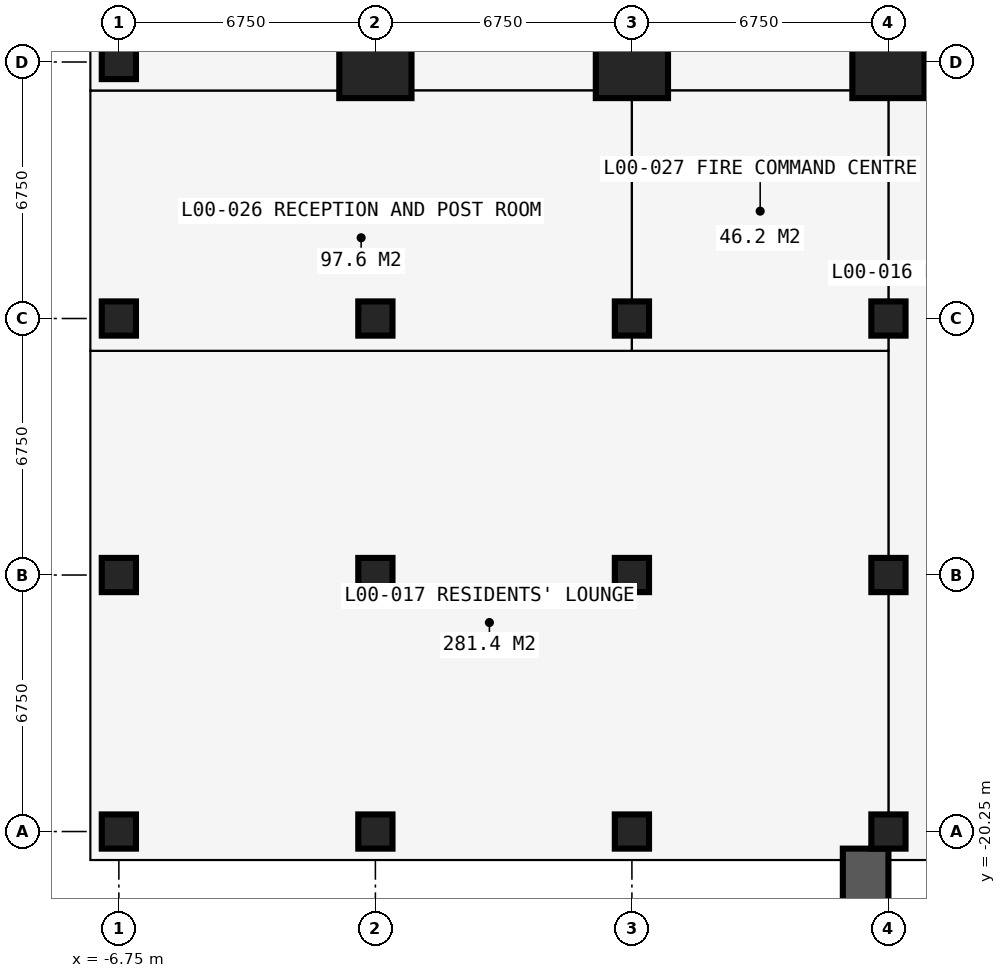
"""IFC4 building model, lengths in metres.
Left out: names, types, materials, properties, quantities, classifications, styles, units other than length and angle.
Written with IfcOpenShell. Run it as: python <this file> out.ifc"""

import sys

from ifc_helpers import new_model, si_unit, direction, frame, frame_2d, origin, origin_with_axes, origin_2d, place, context, subcontext, project, spatial, rectangle, circle, extrude, element, fill, save


model = new_model("IFC4")
c1 = context("Model", 3, precision=1e-05, world=origin(), true_north=direction((0.0, 1.0)))
c2 = subcontext(c1, "Body", "Model", "MODEL_VIEW")
j1 = project(units=[si_unit("LENGTHUNIT", "METRE"), si_unit("PLANEANGLEUNIT", "RADIAN")], contexts=[c1])
p1 = place(None, origin())
s1 = spatial("IfcSite", under=j1, at=p1, CompositionType="ELEMENT")
p2 = place(p1, origin())
s2 = spatial("IfcBuilding", under=s1, at=p2, CompositionType="ELEMENT")
p3 = place(p2, origin())
s3 = spatial("IfcBuildingStorey", under=s2, at=p3, CompositionType="ELEMENT", Elevation=0.0)
for number, where, z_axis, x_axis in (
    (1, (-6.75, -20.25, 0.0), (0.0, 0.0, 1.0), (1.0, 0.0, 0.0)),
    (2, (-6.75, -13.5, 0.0), (0.0, 0.0, 1.0), (1.0, 0.0, 0.0)),
    (3, (-6.75, -6.75, 0.0), (0.0, 0.0, 1.0), (1.0, 0.0, 0.0)),
    (4, (-6.75, 0.0, 0.0), (0.0, 0.0, 1.0), (1.0, 0.0, 0.0)),
    (5, (0.0, -20.25, 0.0), (0.0, 0.0, 1.0), (1.0, 0.0, 0.0)),
    (6, (0.0, -13.5, 0.0), (0.0, 0.0, 1.0), (1.0, 0.0, 0.0)),
    (7, (0.0, -6.75, 0.0), (0.0, 0.0, 1.0), (1.0, 0.0, 0.0)),
):
    element("IfcColumn", number, at=place(p3, frame(where, z_axis=z_axis, x_axis=x_axis)), inside=s3, PredefinedType="COLUMN", context=c2, shape_type="SweptSolid", body=[
        extrude(circle(Radius=0.45, at=origin_2d()), origin(), (0.0, 0.0, 1.0), 4.5),
    ])
p4 = place(p3, origin_with_axes())
e8 = element("IfcColumn", 8, at=p4, inside=s3, PredefinedType="COLUMN", context=c2, shape_type="SweptSolid", body=[
    extrude(rectangle(XDim=1.9, YDim=1.9, at=origin_2d()), origin(), (0.0, 0.0, 1.0), 4.5),
])
for number, where, z_axis, x_axis in (
    (9, (6.75, -20.25, 0.0), (0.0, 0.0, 1.0), (1.0, 0.0, 0.0)),
    (10, (6.75, -13.5, 0.0), (0.0, 0.0, 1.0), (1.0, 0.0, 0.0)),
    (11, (6.75, -6.75, 0.0), (0.0, 0.0, 1.0), (1.0, 0.0, 0.0)),
):
    element("IfcColumn", number, at=place(p3, frame(where, z_axis=z_axis, x_axis=x_axis)), inside=s3, PredefinedType="COLUMN", context=c2, shape_type="SweptSolid", body=[
        extrude(circle(Radius=0.45, at=origin_2d()), origin(), (0.0, 0.0, 1.0), 4.5),
    ])
p5 = place(p3, frame((6.75, 0.0, 0.0), z_axis=(0.0, 0.0, 1.0), x_axis=(1.0, 0.0, 0.0)))
e12 = element("IfcColumn", 12, at=p5, inside=s3, PredefinedType="COLUMN", context=c2, shape_type="SweptSolid", body=[
    extrude(rectangle(XDim=1.9, YDim=1.9, at=origin_2d()), origin(), (0.0, 0.0, 1.0), 4.5),
])
for number, where, z_axis, x_axis in (
    (13, (13.5, -20.25, 0.0), (0.0, 0.0, 1.0), (1.0, 0.0, 0.0)),
    (14, (13.5, -13.5, 0.0), (0.0, 0.0, 1.0), (1.0, 0.0, 0.0)),
    (15, (13.5, -6.75, 0.0), (0.0, 0.0, 1.0), (1.0, 0.0, 0.0)),
):
    element("IfcColumn", number, at=place(p3, frame(where, z_axis=z_axis, x_axis=x_axis)), inside=s3, PredefinedType="COLUMN", context=c2, shape_type="SweptSolid", body=[
        extrude(circle(Radius=0.45, at=origin_2d()), origin(), (0.0, 0.0, 1.0), 4.5),
    ])
p6 = place(p3, frame((13.5, 0.0, 0.0), z_axis=(0.0, 0.0, 1.0), x_axis=(1.0, 0.0, 0.0)))
e16 = element("IfcColumn", 16, at=p6, inside=s3, PredefinedType="COLUMN", context=c2, shape_type="SweptSolid", body=[
    extrude(rectangle(XDim=1.9, YDim=1.9, at=origin_2d()), origin(), (0.0, 0.0, 1.0), 4.5),
])
p7 = place(p3, frame((20.25, -21.0, 0.0), z_axis=(0.0, 0.0, 1.0), x_axis=(-1.0, 0.0, 0.0)))
e17 = element("IfcWall", 17, at=p7, inside=s3, PredefinedType="SOLIDWALL", context=c2, shape_type="SweptSolid", body=[
    extrude(rectangle(XDim=6.75, YDim=0.15, at=frame_2d((3.375, 0.0))), origin(), (0.0, 0.0, 1.0), 4.25),
])
p8 = place(p7, frame((0.788, 0.0, 0.0)))
e18 = element("IfcOpeningElement", 18, at=p8, cuts=e17, PredefinedType="OPENING", context=c2, shape_type="SweptSolid", body=[
    extrude(rectangle(XDim=1.8, YDim=2.7, at=frame_2d((0.9, 1.35))), frame((0.0, 0.085, 0.0), z_axis=(0.0, -1.0, 0.0), x_axis=(1.0, 0.0, 0.0)), (0.0, 0.0, 1.0), 0.17),
])
p9 = place(p7, frame((4.163, 0.0, 0.0)))
e19 = element("IfcOpeningElement", 19, at=p9, cuts=e17, PredefinedType="OPENING", context=c2, shape_type="SweptSolid", body=[
    extrude(rectangle(XDim=1.8, YDim=2.7, at=frame_2d((0.9, 1.35))), frame((0.0, 0.085, 0.0), z_axis=(0.0, -1.0, 0.0), x_axis=(1.0, 0.0, 0.0)), (0.0, 0.0, 1.0), 0.17),
])
p10 = place(p3, frame((12.9, -20.7, 0.0), z_axis=(0.0, 0.0, 1.0), x_axis=(0.0, -1.0, 0.0)))
e20 = element("IfcWall", 20, at=p10, inside=s3, PredefinedType="USERDEFINED", context=c2, shape_type="SweptSolid", body=[
    extrude(rectangle(XDim=2.8, YDim=1.2, at=frame_2d((1.4, 0.0))), origin(), (0.0, 0.0, 1.0), 9.0),
])
p11 = place(p3, frame((-7.484, -7.6, 0.0), z_axis=(0.0, 0.0, 1.0), x_axis=(1.0, 0.0, 0.0)))
e21 = element("IfcWall", 21, at=p11, inside=s3, PredefinedType="PARTITIONING", context=c2, shape_type="SweptSolid", body=[
    extrude(rectangle(XDim=20.984, YDim=0.15, at=frame_2d((10.492, 0.0))), origin(), (0.0, 0.0, 1.0), 4.25),
])
p12 = place(p3, frame((-7.484, -0.75, 0.0), z_axis=(0.0, 0.0, 1.0), x_axis=(1.0, 0.0, 0.0)))
e22 = element("IfcWall", 22, at=p12, inside=s3, PredefinedType="PARTITIONING", context=c2, shape_type="SweptSolid", body=[
    extrude(rectangle(XDim=20.984, YDim=0.15, at=frame_2d((10.492, 0.0))), origin(), (0.0, 0.0, 1.0), 4.25),
])
p13 = place(p12, frame((9.684, 0.0, 0.0)))
e23 = element("IfcOpeningElement", 23, at=p13, cuts=e22, PredefinedType="OPENING", context=c2, shape_type="SweptSolid", body=[
    extrude(rectangle(XDim=1.6, YDim=2.4, at=frame_2d((0.8, 1.2))), frame((0.0, 0.085, 0.0), z_axis=(0.0, -1.0, 0.0), x_axis=(1.0, 0.0, 0.0)), (0.0, 0.0, 1.0), 0.17),
])
p14 = place(p3, frame((-0.75, -0.75, 0.0), z_axis=(0.0, 0.0, 1.0), x_axis=(0.0, 1.0, 0.0)))
e24 = element("IfcWall", 24, at=p14, inside=s3, PredefinedType="PARTITIONING", context=c2, shape_type="SweptSolid", body=[
    extrude(rectangle(XDim=41.984, YDim=0.15, at=frame_2d((20.992, 0.0))), origin(), (0.0, 0.0, 1.0), 4.25),
])
p15 = place(p14, frame((4.95, 0.0, 0.0)))
e25 = element("IfcOpeningElement", 25, at=p15, cuts=e24, PredefinedType="OPENING", context=c2, shape_type="SweptSolid", body=[
    extrude(rectangle(XDim=0.95, YDim=2.2, at=frame_2d((0.475, 1.1))), frame((0.0, 0.085, 0.0), z_axis=(0.0, -1.0, 0.0), x_axis=(1.0, 0.0, 0.0)), (0.0, 0.0, 1.0), 0.17),
])
p16 = place(p14, frame((31.0, 0.0, 0.0)))
e26 = element("IfcOpeningElement", 26, at=p16, cuts=e24, PredefinedType="OPENING", context=c2, shape_type="SweptSolid", body=[
    extrude(rectangle(XDim=0.95, YDim=2.2, at=frame_2d((0.475, 1.1))), frame((0.0, 0.085, 0.0), z_axis=(0.0, -1.0, 0.0), x_axis=(1.0, 0.0, 0.0)), (0.0, 0.0, 1.0), 0.17),
])
p17 = place(p3, frame((6.75, -7.6, 0.0), z_axis=(0.0, 0.0, 1.0), x_axis=(0.0, 1.0, 0.0)))
e27 = element("IfcWall", 27, at=p17, inside=s3, PredefinedType="PARTITIONING", context=c2, shape_type="SweptSolid", body=[
    extrude(rectangle(XDim=6.85, YDim=0.15, at=frame_2d((3.425, 0.0))), origin(), (0.0, 0.0, 1.0), 3.752),
])
p18 = place(p3, frame((13.5, -20.984, 0.0), z_axis=(0.0, 0.0, 1.0), x_axis=(0.0, 1.0, 0.0)))
e28 = element("IfcWall", 28, at=p18, inside=s3, PredefinedType="PARTITIONING", context=c2, shape_type="SweptSolid", body=[
    extrude(rectangle(XDim=20.234, YDim=0.15, at=frame_2d((10.117, 0.0))), origin(), (0.0, 0.0, 1.0), 3.752),
])
p19 = place(p18, frame((5.325, 0.0, 0.0)))
e29 = element("IfcOpeningElement", 29, at=p19, cuts=e28, PredefinedType="OPENING", context=c2, shape_type="SweptSolid", body=[
    extrude(rectangle(XDim=1.5, YDim=2.2, at=frame_2d((0.75, 1.1))), frame((0.0, 0.085, 0.0), z_axis=(0.0, -1.0, 0.0), x_axis=(1.0, 0.0, 0.0)), (0.0, 0.0, 1.0), 0.17),
])
p20 = place(p18, frame((16.184, 0.0, 0.0)))
e30 = element("IfcOpeningElement", 30, at=p20, cuts=e28, PredefinedType="OPENING", context=c2, shape_type="SweptSolid", body=[
    extrude(rectangle(XDim=1.2, YDim=2.2, at=frame_2d((0.6, 1.1))), frame((0.0, 0.085, 0.0), z_axis=(0.0, -1.0, 0.0), x_axis=(1.0, 0.0, 0.0)), (0.0, 0.0, 1.0), 0.17),
])
p21 = place(p9, origin())
e31 = element("IfcDoor", 31, at=p21, inside=s3, OperationType="DOUBLE_DOOR_SINGLE_SWING", PredefinedType="DOOR", context=c2, shape_type="SweptSolid", body=[
    extrude(rectangle(XDim=1.8, YDim=2.7, at=frame_2d((0.9, 1.35))), frame((0.0, 0.025, 0.0), z_axis=(0.0, -1.0, 0.0), x_axis=(1.0, 0.0, 0.0)), (0.0, 0.0, 1.0), 0.05),
])
fill(e19, e31)
p22 = place(p19, origin())
e32 = element("IfcDoor", 32, at=p22, inside=s3, OperationType="DOUBLE_DOOR_SINGLE_SWING", PredefinedType="DOOR", context=c2, shape_type="SweptSolid", body=[
    extrude(rectangle(XDim=1.5, YDim=2.2, at=frame_2d((0.75, 1.1))), frame((0.0, 0.025, 0.0), z_axis=(0.0, -1.0, 0.0), x_axis=(1.0, 0.0, 0.0)), (0.0, 0.0, 1.0), 0.05),
])
fill(e29, e32)
p23 = place(p13, origin())
e33 = element("IfcDoor", 33, at=p23, inside=s3, OperationType="DOUBLE_DOOR_SINGLE_SWING", PredefinedType="DOOR", context=c2, shape_type="SweptSolid", body=[
    extrude(rectangle(XDim=1.6, YDim=2.4, at=frame_2d((0.8, 1.2))), frame((0.0, 0.025, 0.0), z_axis=(0.0, -1.0, 0.0), x_axis=(1.0, 0.0, 0.0)), (0.0, 0.0, 1.0), 0.05),
])
fill(e23, e33)
p24 = place(p20, origin())
e34 = element("IfcDoor", 34, at=p24, inside=s3, OperationType="DOUBLE_DOOR_SINGLE_SWING", PredefinedType="DOOR", context=c2, shape_type="SweptSolid", body=[
    extrude(rectangle(XDim=1.2, YDim=2.2, at=frame_2d((0.6, 1.1))), frame((0.0, 0.025, 0.0), z_axis=(0.0, -1.0, 0.0), x_axis=(1.0, 0.0, 0.0)), (0.0, 0.0, 1.0), 0.05),
])
fill(e30, e34)
save(model, sys.argv[1])
